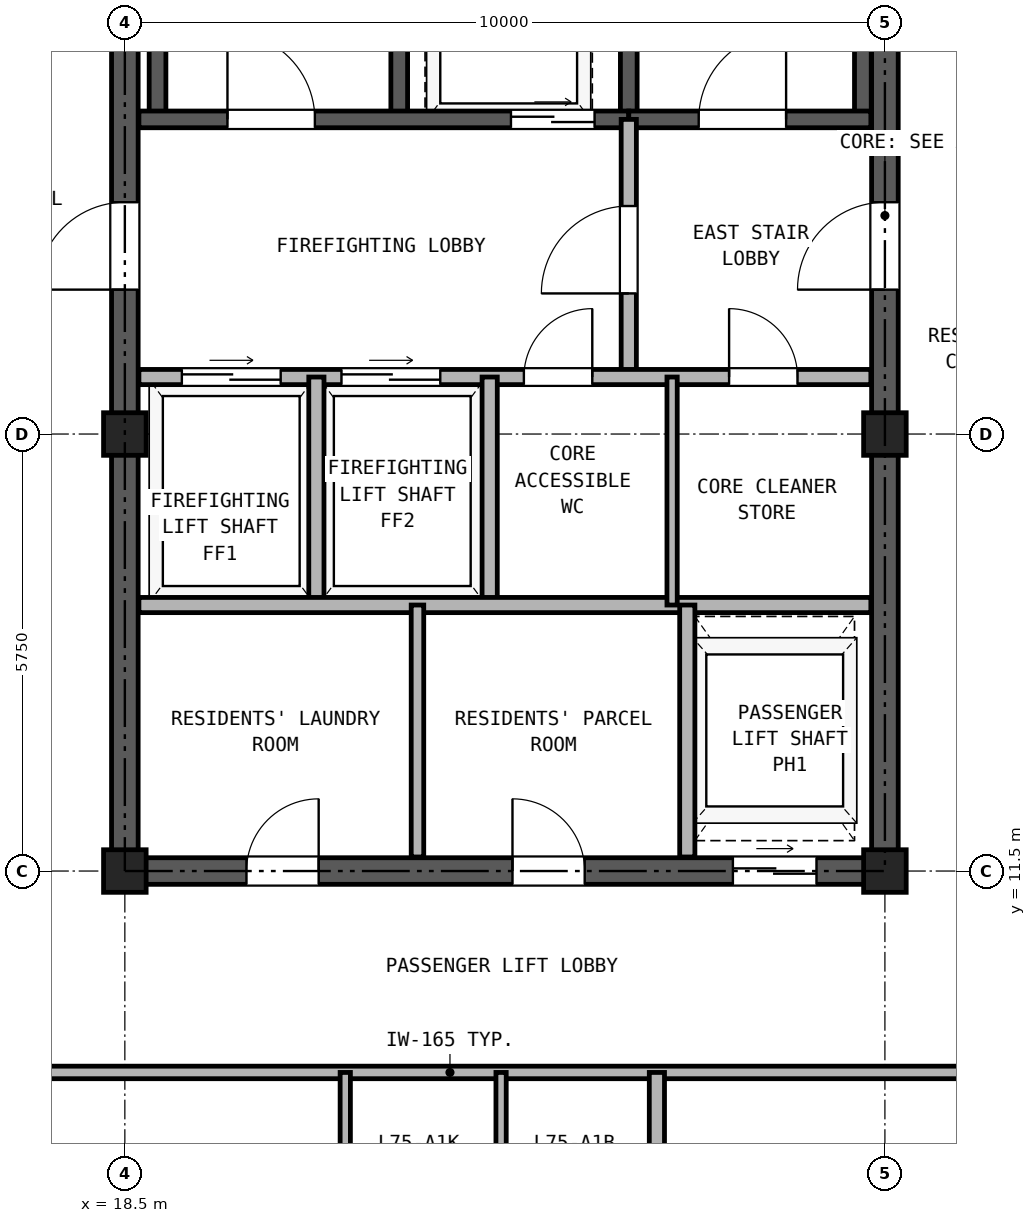
"""IFC4 building model, lengths in metres.
Left out: names, types, materials, properties, quantities, classifications, styles, units other than length and angle.
Written with IfcOpenShell. Run it as: python <this file> out.ifc"""

import sys

from ifc_helpers import new_model, si_unit, direction, frame, frame_2d, origin, origin_2d, place, context, subcontext, project, spatial, rectangle, hollow_rectangle, extrude, source, transform, mapped, element, fill, save


model = new_model("IFC4")
c1 = context("Model", 3, precision=1e-05, world=origin(), true_north=direction((0.0, 1.0)))
c2 = subcontext(c1, "Body", "Model", "MODEL_VIEW")
j1 = project(units=[si_unit("LENGTHUNIT", "METRE"), si_unit("PLANEANGLEUNIT", "RADIAN")], contexts=[c1])
p1 = place(None, origin())
s1 = spatial("IfcSite", under=j1, at=p1, CompositionType="ELEMENT")
p2 = place(p1, origin())
s2 = spatial("IfcBuilding", under=s1, at=p2, CompositionType="ELEMENT")
p3 = place(p2, frame((0.0, 0.0, 261.7)))
s3 = spatial("IfcBuildingStorey", under=s2, at=p3, CompositionType="ELEMENT", Elevation=261.7)
m1 = source(origin(), c2, "Body", "SweptSolid", [
    extrude(hollow_rectangle(XDim=0.56, YDim=0.56, WallThickness=0.03, at=origin_2d()), origin(), (0.0, 0.0, 1.0), 2.98),
])
for number, where, z_axis, x_axis in (
    (1, (18.5, 11.5, 0.0), (0.0, 0.0, 1.0), (1.0, 0.0, 0.0)),
    (2, (18.5, 17.25, 0.0), (0.0, 0.0, 1.0), (1.0, 0.0, 0.0)),
    (3, (28.5, 11.5, 0.0), (0.0, 0.0, 1.0), (1.0, 0.0, 0.0)),
    (4, (28.5, 17.25, 0.0), (0.0, 0.0, 1.0), (1.0, 0.0, 0.0)),
):
    element("IfcColumn", number, at=place(p3, frame(where, z_axis=z_axis, x_axis=x_axis)), inside=s3, PredefinedType="COLUMN", context=c2, shape_type="MappedRepresentation", body=[
        mapped(m1, transform((0.0, 0.0, 0.0), x_axis=(1.0, 0.0, 0.0), y_axis=(0.0, 1.0, 0.0), z_axis=(0.0, 0.0, 1.0), scale=1.0)),
    ])
p4 = place(p3, frame((18.325, 11.5, 0.0), z_axis=(0.0, 0.0, 1.0), x_axis=(1.0, 0.0, 0.0)))
e5 = element("IfcWall", 5, at=p4, inside=s3, PredefinedType="SHEAR", context=c2, shape_type="SweptSolid", body=[
    extrude(rectangle(XDim=10.35, YDim=0.35, at=frame_2d((5.175, 0.0))), origin(), (0.0, 0.0, 1.0), 2.98),
])
p5 = place(p4, frame((1.775, 0.0, 0.0)))
e6 = element("IfcOpeningElement", 6, at=p5, cuts=e5, PredefinedType="OPENING", context=c2, shape_type="SweptSolid", body=[
    extrude(rectangle(XDim=0.95, YDim=2.15, at=frame_2d((0.475, 1.075))), frame((0.0, 0.185, 0.0), z_axis=(0.0, -1.0, 0.0), x_axis=(1.0, 0.0, 0.0)), (0.0, 0.0, 1.0), 0.37),
])
p6 = place(p4, frame((5.275, 0.0, 0.0)))
e7 = element("IfcOpeningElement", 7, at=p6, cuts=e5, PredefinedType="OPENING", context=c2, shape_type="SweptSolid", body=[
    extrude(rectangle(XDim=0.95, YDim=2.15, at=frame_2d((0.475, 1.075))), frame((0.0, 0.185, 0.0), z_axis=(0.0, -1.0, 0.0), x_axis=(1.0, 0.0, 0.0)), (0.0, 0.0, 1.0), 0.37),
])
p7 = place(p4, frame((8.175, 0.0, 0.0)))
e8 = element("IfcOpeningElement", 8, at=p7, cuts=e5, PredefinedType="OPENING", context=c2, shape_type="SweptSolid", body=[
    extrude(rectangle(XDim=1.1, YDim=2.25, at=frame_2d((0.55, 1.125))), frame((0.0, 0.185, 0.0), z_axis=(0.0, -1.0, 0.0), x_axis=(1.0, 0.0, 0.0)), (0.0, 0.0, 1.0), 0.37),
])
p8 = place(p3, frame((18.5, 11.675, 0.0), z_axis=(0.0, 0.0, 1.0), x_axis=(0.0, 1.0, 0.0)))
e9 = element("IfcWall", 9, at=p8, inside=s3, PredefinedType="SHEAR", context=c2, shape_type="SweptSolid", body=[
    extrude(rectangle(XDim=16.9, YDim=0.35, at=frame_2d((8.45, 0.0))), origin(), (0.0, 0.0, 1.0), 2.98),
])
p9 = place(p8, frame((7.475, 0.0, 0.0)))
e10 = element("IfcOpeningElement", 10, at=p9, cuts=e9, PredefinedType="OPENING", context=c2, shape_type="SweptSolid", body=[
    extrude(rectangle(XDim=1.15, YDim=2.2, at=frame_2d((0.575, 1.1))), frame((0.0, 0.185, 0.0), z_axis=(0.0, -1.0, 0.0), x_axis=(1.0, 0.0, 0.0)), (0.0, 0.0, 1.0), 0.37),
])
p10 = place(p3, frame((28.5, 11.675, 0.0), z_axis=(0.0, 0.0, 1.0), x_axis=(0.0, 1.0, 0.0)))
e11 = element("IfcWall", 11, at=p10, inside=s3, PredefinedType="SHEAR", context=c2, shape_type="SweptSolid", body=[
    extrude(rectangle(XDim=16.9, YDim=0.35, at=frame_2d((8.45, 0.0))), origin(), (0.0, 0.0, 1.0), 2.98),
])
p11 = place(p10, frame((7.475, 0.0, 0.0)))
e12 = element("IfcOpeningElement", 12, at=p11, cuts=e11, PredefinedType="OPENING", context=c2, shape_type="SweptSolid", body=[
    extrude(rectangle(XDim=1.15, YDim=2.2, at=frame_2d((0.575, 1.1))), frame((0.0, 0.185, 0.0), z_axis=(0.0, -1.0, 0.0), x_axis=(1.0, 0.0, 0.0)), (0.0, 0.0, 1.0), 0.37),
])
for number, where, z_axis, x_axis in (
    (13, (18.93, 21.39, 0.0), (0.0, 0.0, 1.0), (0.0, 1.0, 0.0)),
    (14, (22.11, 21.39, 0.0), (0.0, 0.0, 1.0), (0.0, 1.0, 0.0)),
    (15, (25.13, 21.39, 0.0), (0.0, 0.0, 1.0), (0.0, 1.0, 0.0)),
):
    element("IfcWall", number, at=place(p3, frame(where, z_axis=z_axis, x_axis=x_axis)), inside=s3, PredefinedType="SOLIDWALL", context=c2, shape_type="SweptSolid", body=[
        extrude(rectangle(XDim=7.11, YDim=0.22, at=frame_2d((3.555, 0.0))), origin(), (0.0, 0.0, 1.0), 2.98),
    ])
p12 = place(p3, frame((28.21, 21.39, 0.0), z_axis=(0.0, 0.0, 1.0), x_axis=(0.0, 1.0, 0.0)))
e16 = element("IfcWall", 16, at=p12, inside=s3, PredefinedType="SOLIDWALL", context=c2, shape_type="SweptSolid", body=[
    extrude(rectangle(XDim=6.945, YDim=0.22, at=frame_2d((3.473, 0.0))), origin(), (0.0, 0.0, 1.0), 2.98),
])
p13 = place(p3, frame((18.685, 21.39, 0.0), z_axis=(0.0, 0.0, 1.0), x_axis=(1.0, 0.0, 0.0)))
e17 = element("IfcWall", 17, at=p13, inside=s3, PredefinedType="SOLIDWALL", context=c2, shape_type="SweptSolid", body=[
    extrude(rectangle(XDim=6.445, YDim=0.22, at=frame_2d((3.222, 0.0))), origin(), (0.0, 0.0, 1.0), 2.98),
])
p14 = place(p13, frame((1.165, 0.0, 0.0)))
e18 = element("IfcOpeningElement", 18, at=p14, cuts=e17, PredefinedType="OPENING", context=c2, shape_type="SweptSolid", body=[
    extrude(rectangle(XDim=1.15, YDim=2.2, at=frame_2d((0.575, 1.1))), frame((0.0, 0.12, 0.0), z_axis=(0.0, -1.0, 0.0), x_axis=(1.0, 0.0, 0.0)), (0.0, 0.0, 1.0), 0.24),
])
p15 = place(p13, frame((4.895, 0.0, 0.0)))
e19 = element("IfcOpeningElement", 19, at=p15, cuts=e17, PredefinedType="OPENING", context=c2, shape_type="SweptSolid", body=[
    extrude(rectangle(XDim=1.1, YDim=2.25, at=frame_2d((0.55, 1.125))), frame((0.0, 0.12, 0.0), z_axis=(0.0, -1.0, 0.0), x_axis=(1.0, 0.0, 0.0)), (0.0, 0.0, 1.0), 0.24),
])
p16 = place(p3, frame((25.13, 21.39, 0.0), z_axis=(0.0, 0.0, 1.0), x_axis=(1.0, 0.0, 0.0)))
e20 = element("IfcWall", 20, at=p16, inside=s3, PredefinedType="SOLIDWALL", context=c2, shape_type="SweptSolid", body=[
    extrude(rectangle(XDim=3.185, YDim=0.22, at=frame_2d((1.593, 0.0))), origin(), (0.0, 0.0, 1.0), 2.98),
])
p17 = place(p16, frame((0.92, 0.0, 0.0)))
e21 = element("IfcOpeningElement", 21, at=p17, cuts=e20, PredefinedType="OPENING", context=c2, shape_type="SweptSolid", body=[
    extrude(rectangle(XDim=1.15, YDim=2.2, at=frame_2d((0.575, 1.1))), frame((0.0, 0.12, 0.0), z_axis=(0.0, -1.0, 0.0), x_axis=(1.0, 0.0, 0.0)), (0.0, 0.0, 1.0), 0.24),
])
p18 = place(p3, frame((25.13, 18.0, 0.0), z_axis=(0.0, 0.0, 1.0), x_axis=(0.0, 1.0, 0.0)))
e22 = element("IfcWall", 22, at=p18, inside=s3, PredefinedType="PARTITIONING", context=c2, shape_type="SweptSolid", body=[
    extrude(rectangle(XDim=3.39, YDim=0.2, at=frame_2d((1.695, 0.0))), origin(), (0.0, 0.0, 1.0), 2.98),
])
p19 = place(p18, frame((1.1, 0.0, 0.0)))
e23 = element("IfcOpeningElement", 23, at=p19, cuts=e22, PredefinedType="OPENING", context=c2, shape_type="SweptSolid", body=[
    extrude(rectangle(XDim=1.15, YDim=2.2, at=frame_2d((0.575, 1.1))), frame((0.0, 0.11, 0.0), z_axis=(0.0, -1.0, 0.0), x_axis=(1.0, 0.0, 0.0)), (0.0, 0.0, 1.0), 0.22),
])
p20 = place(p3, frame((18.685, 18.0, 0.0), z_axis=(0.0, 0.0, 1.0), x_axis=(1.0, 0.0, 0.0)))
e24 = element("IfcWall", 24, at=p20, inside=s3, PredefinedType="PARTITIONING", context=c2, shape_type="SweptSolid", body=[
    extrude(rectangle(XDim=9.63, YDim=0.2, at=frame_2d((4.815, 0.0))), origin(), (0.0, 0.0, 1.0), 2.98),
])
p21 = place(p20, frame((0.565, 0.0, 0.0)))
e25 = element("IfcOpeningElement", 25, at=p21, cuts=e24, PredefinedType="OPENING", context=c2, shape_type="SweptSolid", body=[
    extrude(rectangle(XDim=1.3, YDim=2.3, at=frame_2d((0.65, 1.15))), frame((0.0, 0.11, 0.0), z_axis=(0.0, -1.0, 0.0), x_axis=(1.0, 0.0, 0.0)), (0.0, 0.0, 1.0), 0.22),
])
p22 = place(p20, frame((2.665, 0.0, 0.0)))
e26 = element("IfcOpeningElement", 26, at=p22, cuts=e24, PredefinedType="OPENING", context=c2, shape_type="SweptSolid", body=[
    extrude(rectangle(XDim=1.3, YDim=2.3, at=frame_2d((0.65, 1.15))), frame((0.0, 0.11, 0.0), z_axis=(0.0, -1.0, 0.0), x_axis=(1.0, 0.0, 0.0)), (0.0, 0.0, 1.0), 0.22),
])
p23 = place(p20, frame((5.065, 0.0, 0.0)))
e27 = element("IfcOpeningElement", 27, at=p23, cuts=e24, PredefinedType="OPENING", context=c2, shape_type="SweptSolid", body=[
    extrude(rectangle(XDim=0.9, YDim=2.05, at=frame_2d((0.45, 1.025))), frame((0.0, 0.11, 0.0), z_axis=(0.0, -1.0, 0.0), x_axis=(1.0, 0.0, 0.0)), (0.0, 0.0, 1.0), 0.22),
])
p24 = place(p20, frame((7.765, 0.0, 0.0)))
e28 = element("IfcOpeningElement", 28, at=p24, cuts=e24, PredefinedType="OPENING", context=c2, shape_type="SweptSolid", body=[
    extrude(rectangle(XDim=0.9, YDim=2.05, at=frame_2d((0.45, 1.025))), frame((0.0, 0.11, 0.0), z_axis=(0.0, -1.0, 0.0), x_axis=(1.0, 0.0, 0.0)), (0.0, 0.0, 1.0), 0.22),
])
for number, where, z_axis, x_axis in (
    (29, (21.02, 15.0, 0.0), (0.0, 0.0, 1.0), (0.0, 1.0, 0.0)),
    (30, (23.3, 15.0, 0.0), (0.0, 0.0, 1.0), (0.0, 1.0, 0.0)),
):
    element("IfcWall", number, at=place(p3, frame(where, z_axis=z_axis, x_axis=x_axis)), inside=s3, PredefinedType="PARTITIONING", context=c2, shape_type="SweptSolid", body=[
        extrude(rectangle(XDim=3.0, YDim=0.2, at=frame_2d((1.5, 0.0))), origin(), (0.0, 0.0, 1.0), 2.98),
    ])
p25 = place(p3, frame((18.685, 15.0, 0.0), z_axis=(0.0, 0.0, 1.0), x_axis=(1.0, 0.0, 0.0)))
e31 = element("IfcWall", 31, at=p25, inside=s3, PredefinedType="PARTITIONING", context=c2, shape_type="SweptSolid", body=[
    extrude(rectangle(XDim=9.63, YDim=0.2, at=frame_2d((4.815, 0.0))), origin(), (0.0, 0.0, 1.0), 2.98),
])
p26 = place(p3, frame((25.7, 15.0, 0.0), z_axis=(0.0, 0.0, 1.0), x_axis=(0.0, 1.0, 0.0)))
e32 = element("IfcWall", 32, at=p26, inside=s3, PredefinedType="PARTITIONING", context=c2, shape_type="SweptSolid", body=[
    extrude(rectangle(XDim=3.0, YDim=0.135, at=frame_2d((1.5, 0.0))), origin(), (0.0, 0.0, 1.0), 2.98),
])
p27 = place(p3, frame((22.35, 11.685, 0.0), z_axis=(0.0, 0.0, 1.0), x_axis=(0.0, 1.0, 0.0)))
e33 = element("IfcWall", 33, at=p27, inside=s3, PredefinedType="PARTITIONING", context=c2, shape_type="SweptSolid", body=[
    extrude(rectangle(XDim=3.315, YDim=0.165, at=frame_2d((1.657, 0.0))), origin(), (0.0, 0.0, 1.0), 2.98),
])
p28 = place(p3, frame((25.9, 11.685, 0.0), z_axis=(0.0, 0.0, 1.0), x_axis=(0.0, 1.0, 0.0)))
e34 = element("IfcWall", 34, at=p28, inside=s3, PredefinedType="PARTITIONING", context=c2, shape_type="SweptSolid", body=[
    extrude(rectangle(XDim=3.315, YDim=0.2, at=frame_2d((1.657, 0.0))), origin(), (0.0, 0.0, 1.0), 2.98),
])
p29 = place(p3, frame((5.36, 8.85, 0.0), z_axis=(0.0, 0.0, 1.0), x_axis=(1.0, 0.0, 0.0)))
e35 = element("IfcWall", 35, at=p29, inside=s3, PredefinedType="PARTITIONING", context=c2, shape_type="SweptSolid", body=[
    extrude(rectangle(XDim=36.28, YDim=0.165, at=frame_2d((18.14, 0.0))), origin(), (0.0, 0.0, 1.0), 2.98),
])
p30 = place(p29, frame((9.17, 0.0, 0.0)))
e36 = element("IfcOpeningElement", 36, at=p30, cuts=e35, PredefinedType="OPENING", context=c2, shape_type="SweptSolid", body=[
    extrude(rectangle(XDim=1.0, YDim=2.15, at=frame_2d((0.5, 1.075))), frame((0.0, 0.093, 0.0), z_axis=(0.0, -1.0, 0.0), x_axis=(1.0, 0.0, 0.0)), (0.0, 0.0, 1.0), 0.185),
])
p31 = place(p29, frame((24.665, 0.0, 0.0)))
e37 = element("IfcOpeningElement", 37, at=p31, cuts=e35, PredefinedType="OPENING", context=c2, shape_type="SweptSolid", body=[
    extrude(rectangle(XDim=1.0, YDim=2.15, at=frame_2d((0.5, 1.075))), frame((0.0, 0.093, 0.0), z_axis=(0.0, -1.0, 0.0), x_axis=(1.0, 0.0, 0.0)), (0.0, 0.0, 1.0), 0.185),
])
for number, where, z_axis, x_axis in (
    (38, (21.4, 6.7, 0.0), (0.0, 0.0, 1.0), (0.0, 1.0, 0.0)),
    (39, (23.45, 6.7, 0.0), (0.0, 0.0, 1.0), (0.0, 1.0, 0.0)),
):
    element("IfcWall", number, at=place(p3, frame(where, z_axis=z_axis, x_axis=x_axis)), inside=s3, PredefinedType="PARTITIONING", context=c2, shape_type="SweptSolid", body=[
        extrude(rectangle(XDim=2.15, YDim=0.135, at=frame_2d((1.075, 0.0))), origin(), (0.0, 0.0, 1.0), 2.98),
    ])
p32 = place(p3, frame((25.5, 0.16, 0.0), z_axis=(0.0, 0.0, 1.0), x_axis=(0.0, 1.0, 0.0)))
e40 = element("IfcWall", 40, at=p32, inside=s3, PredefinedType="PARTITIONING", context=c2, shape_type="SweptSolid", body=[
    extrude(rectangle(XDim=8.69, YDim=0.2, at=frame_2d((4.345, 0.0))), origin(), (0.0, 0.0, 1.0), 2.98),
])
p33 = place(p14, frame((1.15, 0.0, 0.0), z_axis=(0.0, 0.0, 1.0), x_axis=(-1.0, 0.0, 0.0)))
e41 = element("IfcDoor", 41, at=p33, inside=s3, OperationType="SINGLE_SWING_LEFT", PredefinedType="DOOR", context=c2, shape_type="SweptSolid", body=[
    extrude(rectangle(XDim=1.15, YDim=2.2, at=frame_2d((0.575, 1.1))), frame((0.0, 0.025, 0.0), z_axis=(0.0, -1.0, 0.0), x_axis=(1.0, 0.0, 0.0)), (0.0, 0.0, 1.0), 0.05),
])
fill(e18, e41)
p34 = place(p17, frame((1.15, 0.0, 0.0), z_axis=(0.0, 0.0, 1.0), x_axis=(-1.0, 0.0, 0.0)))
e42 = element("IfcDoor", 42, at=p34, inside=s3, OperationType="SINGLE_SWING_RIGHT", PredefinedType="DOOR", context=c2, shape_type="SweptSolid", body=[
    extrude(rectangle(XDim=1.15, YDim=2.2, at=frame_2d((0.575, 1.1))), frame((0.0, 0.025, 0.0), z_axis=(0.0, -1.0, 0.0), x_axis=(1.0, 0.0, 0.0)), (0.0, 0.0, 1.0), 0.05),
])
fill(e21, e42)
p35 = place(p15, frame((1.1, 0.0, 0.0), z_axis=(0.0, 0.0, 1.0), x_axis=(-1.0, 0.0, 0.0)))
e43 = element("IfcDoor", 43, at=p35, inside=s3, OperationType="DOUBLE_DOOR_SLIDING", PredefinedType="DOOR", context=c2, shape_type="SweptSolid", body=[
    extrude(rectangle(XDim=1.1, YDim=2.25, at=frame_2d((0.55, 1.125))), frame((0.0, 0.025, 0.0), z_axis=(0.0, -1.0, 0.0), x_axis=(1.0, 0.0, 0.0)), (0.0, 0.0, 1.0), 0.05),
])
fill(e19, e43)
p36 = place(p19, origin())
e44 = element("IfcDoor", 44, at=p36, inside=s3, OperationType="SINGLE_SWING_LEFT", PredefinedType="DOOR", context=c2, shape_type="SweptSolid", body=[
    extrude(rectangle(XDim=1.15, YDim=2.2, at=frame_2d((0.575, 1.1))), frame((0.0, 0.025, 0.0), z_axis=(0.0, -1.0, 0.0), x_axis=(1.0, 0.0, 0.0)), (0.0, 0.0, 1.0), 0.05),
])
fill(e23, e44)
p37 = place(p21, origin())
e45 = element("IfcDoor", 45, at=p37, inside=s3, OperationType="DOUBLE_DOOR_SLIDING", PredefinedType="DOOR", context=c2, shape_type="SweptSolid", body=[
    extrude(rectangle(XDim=1.3, YDim=2.3, at=frame_2d((0.65, 1.15))), frame((0.0, 0.025, 0.0), z_axis=(0.0, -1.0, 0.0), x_axis=(1.0, 0.0, 0.0)), (0.0, 0.0, 1.0), 0.05),
])
fill(e25, e45)
p38 = place(p22, origin())
e46 = element("IfcDoor", 46, at=p38, inside=s3, OperationType="DOUBLE_DOOR_SLIDING", PredefinedType="DOOR", context=c2, shape_type="SweptSolid", body=[
    extrude(rectangle(XDim=1.3, YDim=2.3, at=frame_2d((0.65, 1.15))), frame((0.0, 0.025, 0.0), z_axis=(0.0, -1.0, 0.0), x_axis=(1.0, 0.0, 0.0)), (0.0, 0.0, 1.0), 0.05),
])
fill(e26, e46)
p39 = place(p23, frame((0.9, 0.0, 0.0), z_axis=(0.0, 0.0, 1.0), x_axis=(-1.0, 0.0, 0.0)))
e47 = element("IfcDoor", 47, at=p39, inside=s3, OperationType="SINGLE_SWING_RIGHT", PredefinedType="DOOR", context=c2, shape_type="SweptSolid", body=[
    extrude(rectangle(XDim=0.9, YDim=2.05, at=frame_2d((0.45, 1.025))), frame((0.0, 0.025, 0.0), z_axis=(0.0, -1.0, 0.0), x_axis=(1.0, 0.0, 0.0)), (0.0, 0.0, 1.0), 0.05),
])
fill(e27, e47)
p40 = place(p24, frame((0.9, 0.0, 0.0), z_axis=(0.0, 0.0, 1.0), x_axis=(-1.0, 0.0, 0.0)))
e48 = element("IfcDoor", 48, at=p40, inside=s3, OperationType="SINGLE_SWING_LEFT", PredefinedType="DOOR", context=c2, shape_type="SweptSolid", body=[
    extrude(rectangle(XDim=0.9, YDim=2.05, at=frame_2d((0.45, 1.025))), frame((0.0, 0.025, 0.0), z_axis=(0.0, -1.0, 0.0), x_axis=(1.0, 0.0, 0.0)), (0.0, 0.0, 1.0), 0.05),
])
fill(e28, e48)
p41 = place(p9, frame((1.15, 0.0, 0.0), z_axis=(0.0, 0.0, 1.0), x_axis=(-1.0, 0.0, 0.0)))
e49 = element("IfcDoor", 49, at=p41, inside=s3, OperationType="SINGLE_SWING_LEFT", PredefinedType="DOOR", context=c2, shape_type="SweptSolid", body=[
    extrude(rectangle(XDim=1.15, YDim=2.2, at=frame_2d((0.575, 1.1))), frame((0.0, 0.025, 0.0), z_axis=(0.0, -1.0, 0.0), x_axis=(1.0, 0.0, 0.0)), (0.0, 0.0, 1.0), 0.05),
])
fill(e10, e49)
p42 = place(p11, origin())
e50 = element("IfcDoor", 50, at=p42, inside=s3, OperationType="SINGLE_SWING_LEFT", PredefinedType="DOOR", context=c2, shape_type="SweptSolid", body=[
    extrude(rectangle(XDim=1.15, YDim=2.2, at=frame_2d((0.575, 1.1))), frame((0.0, 0.025, 0.0), z_axis=(0.0, -1.0, 0.0), x_axis=(1.0, 0.0, 0.0)), (0.0, 0.0, 1.0), 0.05),
])
fill(e12, e50)
p43 = place(p5, frame((0.95, 0.0, 0.0), z_axis=(0.0, 0.0, 1.0), x_axis=(-1.0, 0.0, 0.0)))
e51 = element("IfcDoor", 51, at=p43, inside=s3, OperationType="SINGLE_SWING_RIGHT", PredefinedType="DOOR", context=c2, shape_type="SweptSolid", body=[
    extrude(rectangle(XDim=0.95, YDim=2.15, at=frame_2d((0.475, 1.075))), frame((0.0, 0.025, 0.0), z_axis=(0.0, -1.0, 0.0), x_axis=(1.0, 0.0, 0.0)), (0.0, 0.0, 1.0), 0.05),
])
fill(e6, e51)
p44 = place(p6, frame((0.95, 0.0, 0.0), z_axis=(0.0, 0.0, 1.0), x_axis=(-1.0, 0.0, 0.0)))
e52 = element("IfcDoor", 52, at=p44, inside=s3, OperationType="SINGLE_SWING_LEFT", PredefinedType="DOOR", context=c2, shape_type="SweptSolid", body=[
    extrude(rectangle(XDim=0.95, YDim=2.15, at=frame_2d((0.475, 1.075))), frame((0.0, 0.025, 0.0), z_axis=(0.0, -1.0, 0.0), x_axis=(1.0, 0.0, 0.0)), (0.0, 0.0, 1.0), 0.05),
])
fill(e7, e52)
p45 = place(p7, frame((1.1, 0.0, 0.0), z_axis=(0.0, 0.0, 1.0), x_axis=(-1.0, 0.0, 0.0)))
e53 = element("IfcDoor", 53, at=p45, inside=s3, OperationType="DOUBLE_DOOR_SLIDING", PredefinedType="DOOR", context=c2, shape_type="SweptSolid", body=[
    extrude(rectangle(XDim=1.1, YDim=2.25, at=frame_2d((0.55, 1.125))), frame((0.0, 0.025, 0.0), z_axis=(0.0, -1.0, 0.0), x_axis=(1.0, 0.0, 0.0)), (0.0, 0.0, 1.0), 0.05),
])
fill(e8, e53)
save(model, sys.argv[1])
